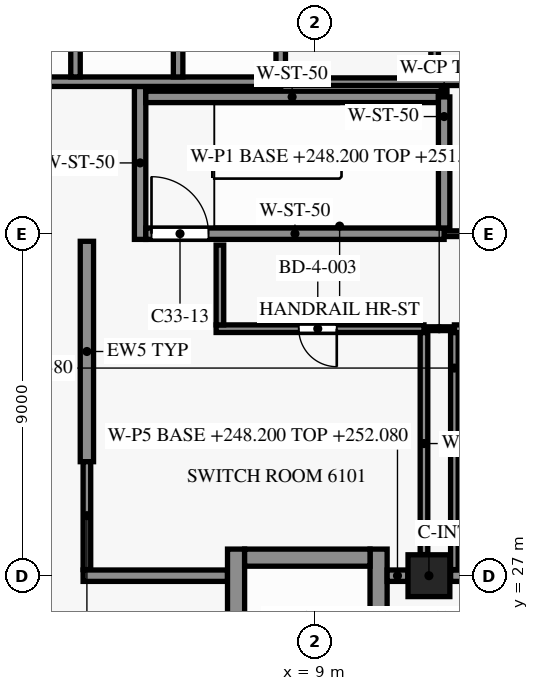
"""IFC4 building model, lengths in metres.
Left out: names, types, materials, properties, quantities, classifications, styles, units other than length and angle.
Written with IfcOpenShell. Run it as: python <this file> out.ifc"""

import sys

from ifc_helpers import new_model, si_unit, direction, frame, frame_2d, origin, origin_2d, place, context, subcontext, project, spatial, rectangle, extrude, element, fill, save


model = new_model("IFC4")
c1 = context("Model", 3, precision=1e-05, world=origin(), true_north=direction((0.0, 1.0)))
c2 = subcontext(c1, "Body", "Model", "MODEL_VIEW")
j1 = project(units=[si_unit("LENGTHUNIT", "METRE"), si_unit("PLANEANGLEUNIT", "RADIAN")], contexts=[c1])
p1 = place(None, origin())
s1 = spatial("IfcSite", under=j1, at=p1, CompositionType="ELEMENT")
p2 = place(p1, origin())
s2 = spatial("IfcBuilding", under=s1, at=p2, CompositionType="ELEMENT")
p3 = place(p2, frame((0.0, 0.0, 248.2)))
s3 = spatial("IfcBuildingStorey", under=s2, at=p3, CompositionType="ELEMENT", Elevation=248.2)
p4 = place(p3, frame((12.0, 27.0, 0.0), z_axis=(0.0, 0.0, 1.0), x_axis=(1.0, 0.0, 0.0)))
e1 = element("IfcColumn", 1, at=p4, inside=s3, PredefinedType="COLUMN", context=c2, shape_type="SweptSolid", body=[
    extrude(rectangle(XDim=1.1, YDim=1.1, at=origin_2d()), origin(), (0.0, 0.0, 1.0), 4.2),
])
p5 = place(p3, frame((3.0, 30.0, 0.0), z_axis=(0.0, 0.0, 1.0), x_axis=(0.0, 1.0, 0.0)))
e2 = element("IfcWall", 2, at=p5, inside=s3, PredefinedType="SOLIDWALL", context=c2, shape_type="SweptSolid", body=[
    extrude(rectangle(XDim=5.8, YDim=0.35, at=frame_2d((2.9, 0.0))), origin(), (0.0, 0.0, 1.0), 3.7),
])
p6 = place(p3, frame((7.15, 27.475, 0.0), z_axis=(0.0, 0.0, 1.0), x_axis=(1.0, 0.0, 0.0)))
e3 = element("IfcWall", 3, at=p6, inside=s3, PredefinedType="SHEAR", context=c2, shape_type="SweptSolid", body=[
    extrude(rectangle(XDim=3.3, YDim=0.45, at=frame_2d((1.65, 0.0))), origin(), (0.0, 0.0, 1.0), 3.9),
])
p7 = place(p3, frame((12.4, 36.0, 0.0), z_axis=(0.0, 0.0, 1.0), x_axis=(1.0, 0.0, 0.0)))
e4 = element("IfcWall", 4, at=p7, inside=s3, PredefinedType="SHEAR", context=c2, shape_type="SweptSolid", body=[
    extrude(rectangle(XDim=11.825, YDim=0.15, at=frame_2d((5.913, 0.0))), origin(), (0.0, 0.0, 1.0), 3.9),
])
p8 = place(p7, frame((1.05, 0.0, 0.0)))
e5 = element("IfcOpeningElement", 5, at=p8, cuts=e4, PredefinedType="OPENING", context=c2, shape_type="SweptSolid", body=[
    extrude(rectangle(XDim=0.9, YDim=2.1, at=frame_2d((0.45, 1.05))), frame((0.0, 0.085, 0.0), z_axis=(0.0, -1.0, 0.0), x_axis=(1.0, 0.0, 0.0)), (0.0, 0.0, 1.0), 0.17),
])
p9 = place(p7, frame((4.15, 0.0, 0.0)))
e6 = element("IfcOpeningElement", 6, at=p9, cuts=e4, PredefinedType="OPENING", context=c2, shape_type="SweptSolid", body=[
    extrude(rectangle(XDim=1.0, YDim=2.1, at=frame_2d((0.5, 1.05))), frame((0.0, 0.085, 0.0), z_axis=(0.0, -1.0, 0.0), x_axis=(1.0, 0.0, 0.0)), (0.0, 0.0, 1.0), 0.17),
])
p10 = place(p7, frame((7.35, 0.0, 0.0)))
e7 = element("IfcOpeningElement", 7, at=p10, cuts=e4, PredefinedType="OPENING", context=c2, shape_type="SweptSolid", body=[
    extrude(rectangle(XDim=0.9, YDim=2.1, at=frame_2d((0.45, 1.05))), frame((0.0, 0.085, 0.0), z_axis=(0.0, -1.0, 0.0), x_axis=(1.0, 0.0, 0.0)), (0.0, 0.0, 1.0), 0.17),
])
p11 = place(p7, frame((10.125, 0.0, 0.0)))
e8 = element("IfcOpeningElement", 8, at=p11, cuts=e4, PredefinedType="OPENING", context=c2, shape_type="SweptSolid", body=[
    extrude(rectangle(XDim=0.95, YDim=2.1, at=frame_2d((0.475, 1.05))), frame((0.0, 0.085, 0.0), z_axis=(0.0, -1.0, 0.0), x_axis=(1.0, 0.0, 0.0)), (0.0, 0.0, 1.0), 0.17),
])
p12 = place(p3, frame((4.55, 36.0, 0.0), z_axis=(0.0, 0.0, 1.0), x_axis=(1.0, 0.0, 0.0)))
e9 = element("IfcWall", 9, at=p12, inside=s3, PredefinedType="SHEAR", context=c2, shape_type="SweptSolid", body=[
    extrude(rectangle(XDim=7.85, YDim=0.3, at=frame_2d((3.925, 0.0))), origin(), (0.0, 0.0, 1.0), 3.9),
])
p13 = place(p12, frame((0.15, 0.0, 0.0)))
e10 = element("IfcOpeningElement", 10, at=p13, cuts=e9, PredefinedType="OPENING", context=c2, shape_type="SweptSolid", body=[
    extrude(rectangle(XDim=1.5, YDim=2.2, at=frame_2d((0.75, 1.1))), frame((0.0, 0.16, 0.0), z_axis=(0.0, -1.0, 0.0), x_axis=(1.0, 0.0, 0.0)), (0.0, 0.0, 1.0), 0.32),
])
p14 = place(p3, frame((4.55, 39.6, 0.0), z_axis=(0.0, 0.0, 1.0), x_axis=(1.0, 0.0, 0.0)))
e11 = element("IfcWall", 11, at=p14, inside=s3, PredefinedType="SHEAR", context=c2, shape_type="SweptSolid", body=[
    extrude(rectangle(XDim=7.7, YDim=0.3, at=frame_2d((3.85, 0.0))), origin(), (0.0, 0.0, 1.0), 3.9),
])
p15 = place(p3, frame((8.1, 40.0, 0.0), z_axis=(0.0, 0.0, 1.0), x_axis=(1.0, 0.0, 0.0)))
e12 = element("IfcWall", 12, at=p15, inside=s3, PredefinedType="PARTITIONING", context=c2, shape_type="SweptSolid", body=[
    extrude(rectangle(XDim=16.1, YDim=0.2, at=frame_2d((8.05, 0.0))), origin(), (0.0, 0.0, 1.0), 3.9),
])
p16 = place(p3, frame((0.125, 40.0, 0.0), z_axis=(0.0, 0.0, 1.0), x_axis=(1.0, 0.0, 0.0)))
e13 = element("IfcWall", 13, at=p16, inside=s3, PredefinedType="SHEAR", context=c2, shape_type="SweptSolid", body=[
    extrude(rectangle(XDim=7.975, YDim=0.25, at=frame_2d((3.988, 0.0))), origin(), (0.0, 0.0, 1.0), 3.9),
])
p17 = place(p3, frame((2.7, 40.125, 0.0), z_axis=(0.0, 0.0, 1.0), x_axis=(0.0, 1.0, 0.0)))
e14 = element("IfcWall", 14, at=p17, inside=s3, PredefinedType="SHEAR", context=c2, shape_type="SweptSolid", body=[
    extrude(rectangle(XDim=2.95, YDim=0.25, at=frame_2d((1.475, 0.0))), origin(), (0.0, 0.0, 1.0), 3.9),
])
p18 = place(p3, frame((4.4, 35.85, 0.0), z_axis=(0.0, 0.0, 1.0), x_axis=(0.0, 1.0, 0.0)))
e15 = element("IfcWall", 15, at=p18, inside=s3, PredefinedType="SHEAR", context=c2, shape_type="SweptSolid", body=[
    extrude(rectangle(XDim=4.025, YDim=0.3, at=frame_2d((2.012, 0.0))), origin(), (0.0, 0.0, 1.0), 3.9),
])
p19 = place(p3, frame((5.4, 40.125, 0.0), z_axis=(0.0, 0.0, 1.0), x_axis=(0.0, 1.0, 0.0)))
e16 = element("IfcWall", 16, at=p19, inside=s3, PredefinedType="SHEAR", context=c2, shape_type="SweptSolid", body=[
    extrude(rectangle(XDim=2.95, YDim=0.25, at=frame_2d((1.475, 0.0))), origin(), (0.0, 0.0, 1.0), 3.9),
])
p20 = place(p3, frame((6.925, 19.1, 0.0), z_axis=(0.0, 0.0, 1.0), x_axis=(0.0, 1.0, 0.0)))
e17 = element("IfcWall", 17, at=p20, inside=s3, PredefinedType="SHEAR", context=c2, shape_type="SweptSolid", body=[
    extrude(rectangle(XDim=8.6, YDim=0.45, at=frame_2d((4.3, 0.0))), origin(), (0.0, 0.0, 1.0), 3.9),
])
p21 = place(p3, frame((8.1, 40.125, 0.0), z_axis=(0.0, 0.0, 1.0), x_axis=(0.0, 1.0, 0.0)))
e18 = element("IfcWall", 18, at=p21, inside=s3, PredefinedType="SHEAR", context=c2, shape_type="SweptSolid", body=[
    extrude(rectangle(XDim=2.95, YDim=0.25, at=frame_2d((1.475, 0.0))), origin(), (0.0, 0.0, 1.0), 3.9),
])
p22 = place(p3, frame((10.675, 19.1, 0.0), z_axis=(0.0, 0.0, 1.0), x_axis=(0.0, 1.0, 0.0)))
e19 = element("IfcWall", 19, at=p22, inside=s3, PredefinedType="SHEAR", context=c2, shape_type="SweptSolid", body=[
    extrude(rectangle(XDim=8.6, YDim=0.45, at=frame_2d((4.3, 0.0))), origin(), (0.0, 0.0, 1.0), 3.9),
])
p23 = place(p22, frame((0.7, 0.0, 0.0)))
e20 = element("IfcOpeningElement", 20, at=p23, cuts=e19, PredefinedType="OPENING", context=c2, shape_type="SweptSolid", body=[
    extrude(rectangle(XDim=1.2, YDim=2.2, at=frame_2d((0.6, 1.1))), frame((0.0, 0.235, 0.0), z_axis=(0.0, -1.0, 0.0), x_axis=(1.0, 0.0, 0.0)), (0.0, 0.0, 1.0), 0.47),
])
p24 = place(p3, frame((12.15, 40.1, 0.0), z_axis=(0.0, 0.0, 1.0), x_axis=(0.0, 1.0, 0.0)))
e21 = element("IfcWall", 21, at=p24, inside=s3, PredefinedType="PARTITIONING", context=c2, shape_type="SweptSolid", body=[
    extrude(rectangle(XDim=3.0, YDim=0.2, at=frame_2d((1.5, 0.0))), origin(), (0.0, 0.0, 1.0), 3.9),
])
p25 = place(p3, frame((12.4, 39.6, 0.0), z_axis=(0.0, 0.0, 1.0), x_axis=(0.0, 1.0, 0.0)))
e22 = element("IfcWall", 22, at=p25, inside=s3, PredefinedType="PARTITIONING", context=c2, shape_type="SweptSolid", body=[
    extrude(rectangle(XDim=0.3, YDim=0.15, at=frame_2d((0.15, 0.0))), origin(), (0.0, 0.0, 1.0), 3.9),
])
p26 = place(p3, frame((12.4, 36.15, 0.0), z_axis=(0.0, 0.0, 1.0), x_axis=(0.0, 1.0, 0.0)))
e23 = element("IfcWall", 23, at=p26, inside=s3, PredefinedType="SHEAR", context=c2, shape_type="SweptSolid", body=[
    extrude(rectangle(XDim=3.45, YDim=0.3, at=frame_2d((1.725, 0.0))), origin(), (0.0, 0.0, 1.0), 3.9),
])
p27 = place(p3, frame((6.7, 27.0, 0.0), z_axis=(0.0, 0.0, 1.0), x_axis=(-1.0, 0.0, 0.0)))
e24 = element("IfcWall", 24, at=p27, inside=s3, PredefinedType="PARTITIONING", context=c2, shape_type="SweptSolid", body=[
    extrude(rectangle(XDim=3.8, YDim=0.3, at=frame_2d((1.9, 0.0))), origin(), (0.0, 0.0, 1.0), 3.28),
])
p28 = place(p3, frame((10.9, 27.0, 0.0), z_axis=(0.0, 0.0, 1.0), x_axis=(1.0, 0.0, 0.0)))
e25 = element("IfcWall", 25, at=p28, inside=s3, PredefinedType="PARTITIONING", context=c2, shape_type="SweptSolid", body=[
    extrude(rectangle(XDim=0.545, YDim=0.3, at=frame_2d((0.272, 0.0))), origin(), (0.0, 0.0, 1.0), 3.88),
])
p29 = place(p3, frame((12.57, 27.0, 0.0), z_axis=(0.0, 0.0, 1.0), x_axis=(1.0, 0.0, 0.0)))
e26 = element("IfcWall", 26, at=p29, inside=s3, PredefinedType="PARTITIONING", context=c2, shape_type="SweptSolid", body=[
    extrude(rectangle(XDim=1.43, YDim=0.3, at=frame_2d((0.715, 0.0))), origin(), (0.0, 0.0, 1.0), 3.28),
])
p30 = place(p3, frame((3.0, 27.16, 0.0), z_axis=(0.0, 0.0, 1.0), x_axis=(0.0, 1.0, 0.0)))
e27 = element("IfcWall", 27, at=p30, inside=s3, PredefinedType="PARTITIONING", context=c2, shape_type="SweptSolid", body=[
    extrude(rectangle(XDim=2.84, YDim=0.2, at=frame_2d((1.42, 0.0))), origin(), (0.0, 0.0, 1.0), 3.28),
])
p31 = place(p3, frame((12.67, 27.16, 0.0), z_axis=(0.0, 0.0, 1.0), x_axis=(0.0, 1.0, 0.0)))
e28 = element("IfcWall", 28, at=p31, inside=s3, PredefinedType="PARTITIONING", context=c2, shape_type="SweptSolid", body=[
    extrude(rectangle(XDim=6.24, YDim=0.2, at=frame_2d((3.12, 0.0))), origin(), (0.0, 0.0, 1.0), 3.28),
])
p32 = place(p3, frame((11.87, 33.4, 0.0), z_axis=(0.0, 0.0, 1.0), x_axis=(0.0, -1.0, 0.0)))
e29 = element("IfcWall", 29, at=p32, inside=s3, PredefinedType="PARTITIONING", context=c2, shape_type="SweptSolid", body=[
    extrude(rectangle(XDim=5.845, YDim=0.2, at=frame_2d((2.922, 0.0))), origin(), (0.0, 0.0, 1.0), 3.88),
])
p33 = place(p3, frame((11.87, 33.5, 0.0), z_axis=(0.0, 0.0, 1.0), x_axis=(-1.0, 0.0, 0.0)))
e30 = element("IfcWall", 30, at=p33, inside=s3, PredefinedType="PARTITIONING", context=c2, shape_type="SweptSolid", body=[
    extrude(rectangle(XDim=5.47, YDim=0.2, at=frame_2d((2.735, 0.0))), origin(), (0.0, 0.0, 1.0), 3.88),
])
p34 = place(p33, frame((2.295, 0.0, 0.0)))
e31 = element("IfcOpeningElement", 31, at=p34, cuts=e30, PredefinedType="OPENING", context=c2, shape_type="SweptSolid", body=[
    extrude(rectangle(XDim=1.0, YDim=2.1, at=frame_2d((0.5, 1.05))), frame((0.0, 0.11, 0.0), z_axis=(0.0, -1.0, 0.0), x_axis=(1.0, 0.0, 0.0)), (0.0, 0.0, 1.0), 0.22),
])
p35 = place(p3, frame((12.67, 33.5, 0.0), z_axis=(0.0, 0.0, 1.0), x_axis=(-1.0, 0.0, 0.0)))
e32 = element("IfcWall", 32, at=p35, inside=s3, PredefinedType="PARTITIONING", context=c2, shape_type="SweptSolid", body=[
    extrude(rectangle(XDim=0.8, YDim=0.1, at=frame_2d((0.4, 0.0))), origin(), (0.0, 0.0, 1.0), 3.28),
])
p36 = place(p3, frame((18.0, 33.5, 0.0), z_axis=(0.0, 0.0, 1.0), x_axis=(-1.0, 0.0, 0.0)))
e33 = element("IfcWall", 33, at=p36, inside=s3, PredefinedType="PARTITIONING", context=c2, shape_type="SweptSolid", body=[
    extrude(rectangle(XDim=5.33, YDim=0.2, at=frame_2d((2.665, 0.0))), origin(), (0.0, 0.0, 1.0), 3.88),
])
p37 = place(p3, frame((6.5, 33.6, 0.0), z_axis=(0.0, 0.0, 1.0), x_axis=(0.0, 1.0, 0.0)))
e34 = element("IfcWall", 34, at=p37, inside=s3, PredefinedType="PARTITIONING", context=c2, shape_type="SweptSolid", body=[
    extrude(rectangle(XDim=2.1, YDim=0.2, at=frame_2d((1.05, 0.0))), origin(), (0.0, 0.0, 1.0), 3.88),
])
p38 = place(p13, origin())
e35 = element("IfcDoor", 35, at=p38, inside=s3, OperationType="SINGLE_SWING_RIGHT", PredefinedType="DOOR", context=c2, shape_type="SweptSolid", body=[
    extrude(rectangle(XDim=1.5, YDim=2.2, at=frame_2d((0.75, 1.1))), frame((0.0, 0.025, 0.0), z_axis=(0.0, -1.0, 0.0), x_axis=(1.0, 0.0, 0.0)), (0.0, 0.0, 1.0), 0.05),
])
fill(e10, e35)
p39 = place(p34, origin())
e36 = element("IfcDoor", 36, at=p39, inside=s3, OperationType="SINGLE_SWING_LEFT", PredefinedType="DOOR", context=c2, shape_type="SweptSolid", body=[
    extrude(rectangle(XDim=1.0, YDim=2.1, at=frame_2d((0.5, 1.05))), frame((0.0, 0.025, 0.0), z_axis=(0.0, -1.0, 0.0), x_axis=(1.0, 0.0, 0.0)), (0.0, 0.0, 1.0), 0.05),
])
fill(e31, e36)
save(model, sys.argv[1])
